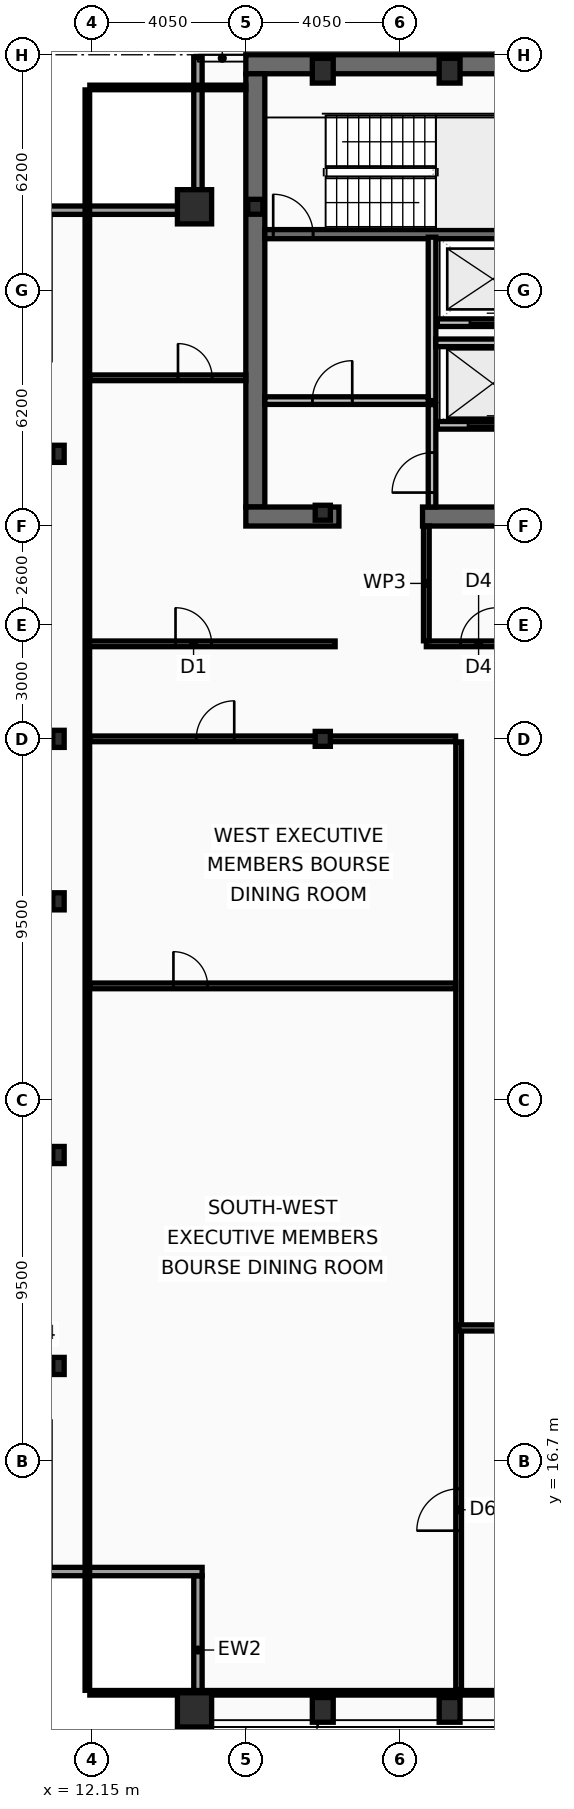
"""IFC4 building model, lengths in metres.
Left out: names, types, materials, properties, quantities, classifications, styles, units other than length and angle.
Written with IfcOpenShell. Run it as: python <this file> out.ifc"""

import sys

from ifc_helpers import new_model, si_unit, direction, frame, frame_2d, origin, origin_2d, place, context, subcontext, project, spatial, rectangle, hollow_rectangle, i_section, extrude, element, fill, save


model = new_model("IFC4")
c1 = context("Model", 3, precision=1e-05, world=origin(), true_north=direction((0.0, 1.0)))
c2 = subcontext(c1, "Body", "Model", "MODEL_VIEW")
j1 = project(units=[si_unit("LENGTHUNIT", "METRE"), si_unit("PLANEANGLEUNIT", "RADIAN")], contexts=[c1])
p1 = place(None, origin())
s1 = spatial("IfcSite", under=j1, at=p1, CompositionType="ELEMENT")
p2 = place(p1, origin())
s2 = spatial("IfcBuilding", under=s1, at=p2, CompositionType="ELEMENT")
p3 = place(p2, frame((0.0, 0.0, 302.2)))
s3 = spatial("IfcBuildingStorey", under=s2, at=p3, CompositionType="ELEMENT", Elevation=302.2)
p4 = place(p3, frame((16.2, 53.45, 0.0), z_axis=(0.0, 0.0, 1.0), x_axis=(1.0, 0.0, 0.0)))
e1 = element("IfcWall", 1, at=p4, inside=s3, PredefinedType="SHEAR", context=c2, shape_type="SweptSolid", body=[
    extrude(rectangle(XDim=40.5, YDim=0.5, at=frame_2d((20.25, 0.0))), origin(), (0.0, 0.0, 1.0), 3.38),
])
p5 = place(p3, frame((16.45, 41.8, 0.0), z_axis=(0.0, 0.0, 1.0), x_axis=(0.0, 1.0, 0.0)))
e2 = element("IfcWall", 2, at=p5, inside=s3, PredefinedType="SHEAR", context=c2, shape_type="SweptSolid", body=[
    extrude(rectangle(XDim=11.4, YDim=0.5, at=frame_2d((5.7, 0.0))), origin(), (0.0, 0.0, 1.0), 3.38),
])
p6 = place(p3, frame((18.65, 41.55, 0.0), z_axis=(0.0, 0.0, 1.0), x_axis=(-1.0, 0.0, 0.0)))
e3 = element("IfcWall", 3, at=p6, inside=s3, PredefinedType="SHEAR", context=c2, shape_type="SweptSolid", body=[
    extrude(rectangle(XDim=2.45, YDim=0.5, at=frame_2d((1.225, 0.0))), origin(), (0.0, 0.0, 1.0), 3.38),
])
p7 = place(p3, frame((32.3, 41.55, 0.0), z_axis=(0.0, 0.0, 1.0), x_axis=(-1.0, 0.0, 0.0)))
e4 = element("IfcWall", 4, at=p7, inside=s3, PredefinedType="SHEAR", context=c2, shape_type="SweptSolid", body=[
    extrude(rectangle(XDim=11.45, YDim=0.5, at=frame_2d((5.725, 0.0))), origin(), (0.0, 0.0, 1.0), 3.38),
])
p8 = place(p3, frame((16.7, 48.98, 0.0), z_axis=(0.0, 0.0, 1.0), x_axis=(1.0, 0.0, 0.0)))
e5 = element("IfcWall", 5, at=p8, inside=s3, PredefinedType="SHEAR", context=c2, shape_type="SweptSolid", body=[
    extrude(rectangle(XDim=7.52, YDim=0.24, at=frame_2d((3.76, 0.0))), origin(), (0.0, 0.0, 1.0), 3.38),
])
p9 = place(p8, frame((0.22, 0.0, 0.0)))
e6 = element("IfcOpeningElement", 6, at=p9, cuts=e5, PredefinedType="OPENING", context=c2, shape_type="SweptSolid", body=[
    extrude(rectangle(XDim=1.05, YDim=2.15, at=frame_2d((0.525, 1.075))), frame((0.0, 0.13, 0.0), z_axis=(0.0, -1.0, 0.0), x_axis=(1.0, 0.0, 0.0)), (0.0, 0.0, 1.0), 0.26),
])
for number, where, z_axis, x_axis in (
    (7, (14.85, 10.15, 0.0), (0.0, 0.0, 1.0), (1.0, 0.0, 0.0)),
    (8, (14.85, 49.7, 0.0), (0.0, 0.0, 1.0), (1.0, 0.0, 0.0)),
):
    element("IfcColumn", number, at=place(p3, frame(where, z_axis=z_axis, x_axis=x_axis)), inside=s3, PredefinedType="COLUMN", context=c2, shape_type="SweptSolid", body=[
        extrude(hollow_rectangle(XDim=0.9, YDim=0.9, WallThickness=0.05, at=origin_2d()), origin(), (0.0, 0.0, 1.0), 3.6),
    ])
for number, where, z_axis, x_axis in (
    (9, (18.225, 10.15, 0.0), (0.0, 0.0, 1.0), (1.0, 0.0, 0.0)),
    (10, (21.562, 10.15, 0.0), (0.0, 0.0, 1.0), (1.0, 0.0, 0.0)),
    (11, (18.225, 53.28, 0.0), (0.0, 0.0, 1.0), (1.0, 0.0, 0.0)),
    (12, (21.562, 53.28, 0.0), (0.0, 0.0, 1.0), (1.0, 0.0, 0.0)),
):
    element("IfcColumn", number, at=place(p3, frame(where, z_axis=z_axis, x_axis=x_axis)), inside=s3, PredefinedType="COLUMN", context=c2, shape_type="SweptSolid", body=[
        extrude(hollow_rectangle(XDim=0.55, YDim=0.65, WallThickness=0.04, at=origin_2d()), origin(), (0.0, 0.0, 1.0), 3.6),
    ])
for number, where, z_axis, x_axis in (
    (13, (11.27, 19.2, 0.0), (0.0, 0.0, 1.0), (1.0, 0.0, 0.0)),
    (14, (11.27, 24.75, 0.0), (0.0, 0.0, 1.0), (1.0, 0.0, 0.0)),
    (15, (11.27, 31.425, 0.0), (0.0, 0.0, 1.0), (1.0, 0.0, 0.0)),
    (16, (11.27, 35.7, 0.0), (0.0, 0.0, 1.0), (1.0, 0.0, 0.0)),
    (17, (11.27, 43.2, 0.0), (0.0, 0.0, 1.0), (1.0, 0.0, 0.0)),
):
    element("IfcColumn", number, at=place(p3, frame(where, z_axis=z_axis, x_axis=x_axis)), inside=s3, PredefinedType="COLUMN", context=c2, shape_type="SweptSolid", body=[
        extrude(i_section(OverallWidth=0.3, OverallDepth=0.45, WebThickness=0.014, FlangeThickness=0.026, at=origin_2d()), origin(), (0.0, 0.0, 1.0), 3.6),
    ])
for number, where, z_axis, x_axis in (
    (18, (16.45, 49.7, 0.0), (0.0, 0.0, 1.0), (1.0, 0.0, 0.0)),
    (19, (18.225, 35.7, 0.0), (0.0, 0.0, 1.0), (1.0, 0.0, 0.0)),
    (20, (18.225, 41.65, 0.0), (0.0, 0.0, 1.0), (1.0, 0.0, 0.0)),
):
    element("IfcColumn", number, at=place(p3, frame(where, z_axis=z_axis, x_axis=x_axis)), inside=s3, PredefinedType="COLUMN", context=c2, shape_type="SweptSolid", body=[
        extrude(i_section(OverallWidth=0.399, OverallDepth=0.393, WebThickness=0.023, FlangeThickness=0.037, at=origin_2d()), origin(), (0.0, 0.0, 1.0), 3.6),
    ])
p10 = place(p3, frame((14.94, 9.77, 0.0), z_axis=(0.0, 0.0, 1.0), x_axis=(0.0, 1.0, 0.0)))
e21 = element("IfcWall", 21, at=p10, inside=s3, PredefinedType="SOLIDWALL", context=c2, shape_type="SweptSolid", body=[
    extrude(rectangle(XDim=3.91, YDim=0.22, at=frame_2d((1.955, 0.0))), origin(), (0.0, 0.0, 1.0), 2.82),
])
for number, where, z_axis, x_axis in (
    (22, (15.05, 13.79, 0.0), (0.0, 0.0, 1.0), (-1.0, 0.0, 0.0)),
    (23, (10.83, 49.61, 0.0), (0.0, 0.0, 1.0), (1.0, 0.0, 0.0)),
):
    element("IfcWall", number, at=place(p3, frame(where, z_axis=z_axis, x_axis=x_axis)), inside=s3, PredefinedType="SOLIDWALL", context=c2, shape_type="SweptSolid", body=[
        extrude(rectangle(XDim=4.22, YDim=0.22, at=frame_2d((2.11, 0.0))), origin(), (0.0, 0.0, 1.0), 2.82),
    ])
p11 = place(p3, frame((14.94, 49.72, 0.0), z_axis=(0.0, 0.0, 1.0), x_axis=(0.0, 1.0, 0.0)))
e24 = element("IfcWall", 24, at=p11, inside=s3, PredefinedType="SOLIDWALL", context=c2, shape_type="SweptSolid", body=[
    extrude(rectangle(XDim=3.91, YDim=0.22, at=frame_2d((1.955, 0.0))), origin(), (0.0, 0.0, 1.0), 2.82),
])
p12 = place(p3, frame((24.21, 43.95, 0.0), z_axis=(0.0, 0.0, 1.0), x_axis=(-1.0, 0.0, 0.0)))
e25 = element("IfcWall", 25, at=p12, inside=s3, PredefinedType="PARTITIONING", context=c2, shape_type="SweptSolid", body=[
    extrude(rectangle(XDim=2.97, YDim=0.2, at=frame_2d((1.485, 0.0))), origin(), (0.0, 0.0, 1.0), 3.38),
])
p13 = place(p12, frame((0.86, 0.0, 0.0)))
e26 = element("IfcOpeningElement", 26, at=p13, cuts=e25, PredefinedType="OPENING", context=c2, shape_type="SweptSolid", body=[
    extrude(rectangle(XDim=1.3, YDim=2.18, at=frame_2d((0.65, 1.09))), frame((0.0, 0.11, 0.0), z_axis=(0.0, -1.0, 0.0), x_axis=(1.0, 0.0, 0.0)), (0.0, 0.0, 1.0), 0.22),
])
p14 = place(p3, frame((24.21, 46.65, 0.0), z_axis=(0.0, 0.0, 1.0), x_axis=(-1.0, 0.0, 0.0)))
e27 = element("IfcWall", 27, at=p14, inside=s3, PredefinedType="PARTITIONING", context=c2, shape_type="SweptSolid", body=[
    extrude(rectangle(XDim=2.97, YDim=0.2, at=frame_2d((1.485, 0.0))), origin(), (0.0, 0.0, 1.0), 3.38),
])
p15 = place(p14, frame((0.91, 0.0, 0.0)))
e28 = element("IfcOpeningElement", 28, at=p15, cuts=e27, PredefinedType="OPENING", context=c2, shape_type="SweptSolid", body=[
    extrude(rectangle(XDim=1.2, YDim=2.18, at=frame_2d((0.6, 1.09))), frame((0.0, 0.11, 0.0), z_axis=(0.0, -1.0, 0.0), x_axis=(1.0, 0.0, 0.0)), (0.0, 0.0, 1.0), 0.22),
])
p16 = place(p3, frame((21.1, 44.6, 0.0), z_axis=(0.0, 0.0, 1.0), x_axis=(0.0, 1.0, 0.0)))
e29 = element("IfcWall", 29, at=p16, inside=s3, PredefinedType="PARTITIONING", context=c2, shape_type="SweptSolid", body=[
    extrude(rectangle(XDim=4.3, YDim=0.2, at=frame_2d((2.15, 0.0))), origin(), (0.0, 0.0, 1.0), 3.38),
])
p17 = place(p3, frame((16.7, 44.6, 0.0), z_axis=(0.0, 0.0, 1.0), x_axis=(1.0, 0.0, 0.0)))
e30 = element("IfcWall", 30, at=p17, inside=s3, PredefinedType="PARTITIONING", context=c2, shape_type="SweptSolid", body=[
    extrude(rectangle(XDim=4.3, YDim=0.2, at=frame_2d((2.15, 0.0))), origin(), (0.0, 0.0, 1.0), 3.38),
])
p18 = place(p17, frame((1.25, 0.0, 0.0)))
e31 = element("IfcOpeningElement", 31, at=p18, cuts=e30, PredefinedType="OPENING", context=c2, shape_type="SweptSolid", body=[
    extrude(rectangle(XDim=1.05, YDim=2.15, at=frame_2d((0.525, 1.075))), frame((0.0, 0.11, 0.0), z_axis=(0.0, -1.0, 0.0), x_axis=(1.0, 0.0, 0.0)), (0.0, 0.0, 1.0), 0.22),
])
p19 = place(p3, frame((21.2, 46.12, 0.0), z_axis=(0.0, 0.0, 1.0), x_axis=(1.0, 0.0, 0.0)))
e32 = element("IfcWall", 32, at=p19, inside=s3, PredefinedType="PARTITIONING", context=c2, shape_type="SweptSolid", body=[
    extrude(rectangle(XDim=3.02, YDim=0.2, at=frame_2d((1.51, 0.0))), origin(), (0.0, 0.0, 1.0), 3.38),
])
p20 = place(p3, frame((21.1, 41.8, 0.0), z_axis=(0.0, 0.0, 1.0), x_axis=(0.0, 1.0, 0.0)))
e33 = element("IfcWall", 33, at=p20, inside=s3, PredefinedType="PARTITIONING", context=c2, shape_type="SweptSolid", body=[
    extrude(rectangle(XDim=2.695, YDim=0.2, at=frame_2d((1.348, 0.0))), origin(), (0.0, 0.0, 1.0), 3.38),
])
p21 = place(p20, frame((0.38, 0.0, 0.0)))
e34 = element("IfcOpeningElement", 34, at=p21, cuts=e33, PredefinedType="OPENING", context=c2, shape_type="SweptSolid", body=[
    extrude(rectangle(XDim=1.05, YDim=2.15, at=frame_2d((0.525, 1.075))), frame((0.0, 0.11, 0.0), z_axis=(0.0, -1.0, 0.0), x_axis=(1.0, 0.0, 0.0)), (0.0, 0.0, 1.0), 0.22),
])
p22 = place(p3, frame((20.95, 38.2, 0.0), z_axis=(0.0, 0.0, 1.0), x_axis=(1.0, 0.0, 0.0)))
e35 = element("IfcWall", 35, at=p22, inside=s3, PredefinedType="PARTITIONING", context=c2, shape_type="SweptSolid", body=[
    extrude(rectangle(XDim=4.15, YDim=0.15, at=frame_2d((2.075, 0.0))), origin(), (0.0, 0.0, 1.0), 2.72),
])
p23 = place(p22, frame((0.9, 0.0, 0.0)))
e36 = element("IfcOpeningElement", 36, at=p23, cuts=e35, PredefinedType="OPENING", context=c2, shape_type="SweptSolid", body=[
    extrude(rectangle(XDim=0.95, YDim=2.05, at=frame_2d((0.475, 1.025))), frame((0.0, 0.085, 0.0), z_axis=(0.0, -1.0, 0.0), x_axis=(1.0, 0.0, 0.0)), (0.0, 0.0, 1.0), 0.17),
])
p24 = place(p3, frame((20.95, 38.28, 0.0), z_axis=(0.0, 0.0, 1.0), x_axis=(0.0, 1.0, 0.0)))
e37 = element("IfcWall", 37, at=p24, inside=s3, PredefinedType="PARTITIONING", context=c2, shape_type="SweptSolid", body=[
    extrude(rectangle(XDim=3.02, YDim=0.15, at=frame_2d((1.51, 0.0))), origin(), (0.0, 0.0, 1.0), 3.38),
])
p25 = place(p3, frame((12.03, 38.2, 0.0), z_axis=(0.0, 0.0, 1.0), x_axis=(1.0, 0.0, 0.0)))
e38 = element("IfcWall", 38, at=p25, inside=s3, PredefinedType="PARTITIONING", context=c2, shape_type="SweptSolid", body=[
    extrude(rectangle(XDim=6.52, YDim=0.15, at=frame_2d((3.26, 0.0))), origin(), (0.0, 0.0, 1.0), 2.72),
])
p26 = place(p25, frame((2.32, 0.0, 0.0)))
e39 = element("IfcOpeningElement", 39, at=p26, cuts=e38, PredefinedType="OPENING", context=c2, shape_type="SweptSolid", body=[
    extrude(rectangle(XDim=0.95, YDim=2.05, at=frame_2d((0.475, 1.025))), frame((0.0, 0.085, 0.0), z_axis=(0.0, -1.0, 0.0), x_axis=(1.0, 0.0, 0.0)), (0.0, 0.0, 1.0), 0.17),
])
p27 = place(p3, frame((12.095, 45.2, 0.0), z_axis=(0.0, 0.0, 1.0), x_axis=(1.0, 0.0, 0.0)))
e40 = element("IfcWall", 40, at=p27, inside=s3, PredefinedType="PARTITIONING", context=c2, shape_type="SweptSolid", body=[
    extrude(rectangle(XDim=4.105, YDim=0.15, at=frame_2d((2.052, 0.0))), origin(), (0.0, 0.0, 1.0), 2.82),
])
p28 = place(p27, frame((2.32, 0.0, 0.0)))
e41 = element("IfcOpeningElement", 41, at=p28, cuts=e40, PredefinedType="OPENING", context=c2, shape_type="SweptSolid", body=[
    extrude(rectangle(XDim=0.9, YDim=2.05, at=frame_2d((0.45, 1.025))), frame((0.0, 0.085, 0.0), z_axis=(0.0, -1.0, 0.0), x_axis=(1.0, 0.0, 0.0)), (0.0, 0.0, 1.0), 0.17),
])
p29 = place(p3, frame((21.8, 10.665, 0.0), z_axis=(0.0, 0.0, 1.0), x_axis=(0.0, 1.0, 0.0)))
e42 = element("IfcWall", 42, at=p29, inside=s3, PredefinedType="PARTITIONING", context=c2, shape_type="SweptSolid", body=[
    extrude(rectangle(XDim=24.955, YDim=0.15, at=frame_2d((12.478, 0.0))), origin(), (0.0, 0.0, 1.0), 2.97),
])
p30 = place(p29, frame((4.2, 0.0, 0.0)))
e43 = element("IfcOpeningElement", 43, at=p30, cuts=e42, PredefinedType="OPENING", context=c2, shape_type="SweptSolid", body=[
    extrude(rectangle(XDim=1.1, YDim=2.1, at=frame_2d((0.55, 1.05))), frame((0.0, 0.085, 0.0), z_axis=(0.0, -1.0, 0.0), x_axis=(1.0, 0.0, 0.0)), (0.0, 0.0, 1.0), 0.17),
])
p31 = place(p3, frame((12.095, 35.7, 0.0), z_axis=(0.0, 0.0, 1.0), x_axis=(1.0, 0.0, 0.0)))
e44 = element("IfcWall", 44, at=p31, inside=s3, PredefinedType="PARTITIONING", context=c2, shape_type="SweptSolid", body=[
    extrude(rectangle(XDim=9.625, YDim=0.15, at=frame_2d((4.812, 0.0))), origin(), (0.0, 0.0, 1.0), 2.72),
])
p32 = place(p31, frame((2.8, 0.0, 0.0)))
e45 = element("IfcOpeningElement", 45, at=p32, cuts=e44, PredefinedType="OPENING", context=c2, shape_type="SweptSolid", body=[
    extrude(rectangle(XDim=1.0, YDim=2.05, at=frame_2d((0.5, 1.025))), frame((0.0, 0.085, 0.0), z_axis=(0.0, -1.0, 0.0), x_axis=(1.0, 0.0, 0.0)), (0.0, 0.0, 1.0), 0.17),
])
p33 = place(p3, frame((12.095, 29.2, 0.0), z_axis=(0.0, 0.0, 1.0), x_axis=(1.0, 0.0, 0.0)))
e46 = element("IfcWall", 46, at=p33, inside=s3, PredefinedType="PARTITIONING", context=c2, shape_type="SweptSolid", body=[
    extrude(rectangle(XDim=9.625, YDim=0.15, at=frame_2d((4.812, 0.0))), origin(), (0.0, 0.0, 1.0), 2.72),
])
p34 = place(p33, frame((2.2, 0.0, 0.0)))
e47 = element("IfcOpeningElement", 47, at=p34, cuts=e46, PredefinedType="OPENING", context=c2, shape_type="SweptSolid", body=[
    extrude(rectangle(XDim=0.9, YDim=2.05, at=frame_2d((0.45, 1.025))), frame((0.0, 0.085, 0.0), z_axis=(0.0, -1.0, 0.0), x_axis=(1.0, 0.0, 0.0)), (0.0, 0.0, 1.0), 0.17),
])
p35 = place(p3, frame((21.8, 20.2, 0.0), z_axis=(0.0, 0.0, 1.0), x_axis=(1.0, 0.0, 0.0)))
e48 = element("IfcWall", 48, at=p35, inside=s3, PredefinedType="PARTITIONING", context=c2, shape_type="SweptSolid", body=[
    extrude(rectangle(XDim=9.26, YDim=0.16, at=frame_2d((4.63, 0.0))), origin(), (0.0, 0.0, 1.0), 2.72),
])
p36 = place(p35, frame((4.139, 0.0, 0.0)))
e49 = element("IfcOpeningElement", 49, at=p36, cuts=e48, PredefinedType="OPENING", context=c2, shape_type="SweptSolid", body=[
    extrude(rectangle(XDim=1.0, YDim=2.05, at=frame_2d((0.5, 1.025))), frame((0.0, 0.09, 0.0), z_axis=(0.0, -1.0, 0.0), x_axis=(1.0, 0.0, 0.0)), (0.0, 0.0, 1.0), 0.18),
])
p37 = place(p3, frame((12.03, 10.665, 0.0), z_axis=(0.0, 0.0, 1.0), x_axis=(0.0, 1.0, 0.0)))
e50 = element("IfcWall", 50, at=p37, inside=s3, PredefinedType="PARTITIONING", context=c2, shape_type="SweptSolid", body=[
    extrude(rectangle(XDim=42.11, YDim=0.12, at=frame_2d((21.055, 0.0))), origin(), (0.0, 0.0, 1.0), 2.72),
])
p38 = place(p3, frame((12.095, 52.84, 0.0), z_axis=(0.0, 0.0, 1.0), x_axis=(1.0, 0.0, 0.0)))
e51 = element("IfcWall", 51, at=p38, inside=s3, PredefinedType="PARTITIONING", context=c2, shape_type="SweptSolid", body=[
    extrude(rectangle(XDim=4.105, YDim=0.12, at=frame_2d((2.052, 0.0))), origin(), (0.0, 0.0, 1.0), 3.38),
])
p39 = place(p3, frame((12.095, 10.6, 0.0), z_axis=(0.0, 0.0, 1.0), x_axis=(1.0, 0.0, 0.0)))
e52 = element("IfcWall", 52, at=p39, inside=s3, PredefinedType="PARTITIONING", context=c2, shape_type="SweptSolid", body=[
    extrude(rectangle(XDim=48.71, YDim=0.12, at=frame_2d((24.355, 0.0))), origin(), (0.0, 0.0, 1.0), 2.72),
])
p40 = place(p9, origin())
e53 = element("IfcDoor", 53, at=p40, inside=s3, OperationType="SINGLE_SWING_LEFT", PredefinedType="DOOR", context=c2, shape_type="SweptSolid", body=[
    extrude(rectangle(XDim=1.05, YDim=2.15, at=frame_2d((0.525, 1.075))), frame((0.0, 0.025, 0.0), z_axis=(0.0, -1.0, 0.0), x_axis=(1.0, 0.0, 0.0)), (0.0, 0.0, 1.0), 0.05),
])
fill(e6, e53)
p41 = place(p13, origin())
e54 = element("IfcDoor", 54, at=p41, inside=s3, OperationType="SLIDING_TO_LEFT", PredefinedType="DOOR", context=c2, shape_type="SweptSolid", body=[
    extrude(rectangle(XDim=1.3, YDim=2.18, at=frame_2d((0.65, 1.09))), frame((0.0, 0.025, 0.0), z_axis=(0.0, -1.0, 0.0), x_axis=(1.0, 0.0, 0.0)), (0.0, 0.0, 1.0), 0.05),
])
fill(e26, e54)
p42 = place(p15, origin())
e55 = element("IfcDoor", 55, at=p42, inside=s3, OperationType="SLIDING_TO_LEFT", PredefinedType="DOOR", context=c2, shape_type="SweptSolid", body=[
    extrude(rectangle(XDim=1.2, YDim=2.18, at=frame_2d((0.6, 1.09))), frame((0.0, 0.025, 0.0), z_axis=(0.0, -1.0, 0.0), x_axis=(1.0, 0.0, 0.0)), (0.0, 0.0, 1.0), 0.05),
])
fill(e28, e55)
p43 = place(p18, origin())
e56 = element("IfcDoor", 56, at=p43, inside=s3, OperationType="SINGLE_SWING_RIGHT", PredefinedType="DOOR", context=c2, shape_type="SweptSolid", body=[
    extrude(rectangle(XDim=1.05, YDim=2.15, at=frame_2d((0.525, 1.075))), frame((0.0, 0.025, 0.0), z_axis=(0.0, -1.0, 0.0), x_axis=(1.0, 0.0, 0.0)), (0.0, 0.0, 1.0), 0.05),
])
fill(e31, e56)
p44 = place(p21, origin())
e57 = element("IfcDoor", 57, at=p44, inside=s3, OperationType="SINGLE_SWING_LEFT", PredefinedType="DOOR", context=c2, shape_type="SweptSolid", body=[
    extrude(rectangle(XDim=1.05, YDim=2.15, at=frame_2d((0.525, 1.075))), frame((0.0, 0.025, 0.0), z_axis=(0.0, -1.0, 0.0), x_axis=(1.0, 0.0, 0.0)), (0.0, 0.0, 1.0), 0.05),
])
fill(e34, e57)
p45 = place(p23, origin())
e58 = element("IfcDoor", 58, at=p45, inside=s3, OperationType="SINGLE_SWING_RIGHT", PredefinedType="DOOR", context=c2, shape_type="SweptSolid", body=[
    extrude(rectangle(XDim=0.95, YDim=2.05, at=frame_2d((0.475, 1.025))), frame((0.0, 0.025, 0.0), z_axis=(0.0, -1.0, 0.0), x_axis=(1.0, 0.0, 0.0)), (0.0, 0.0, 1.0), 0.05),
])
fill(e36, e58)
p46 = place(p26, origin())
e59 = element("IfcDoor", 59, at=p46, inside=s3, OperationType="SINGLE_SWING_LEFT", PredefinedType="DOOR", context=c2, shape_type="SweptSolid", body=[
    extrude(rectangle(XDim=0.95, YDim=2.05, at=frame_2d((0.475, 1.025))), frame((0.0, 0.025, 0.0), z_axis=(0.0, -1.0, 0.0), x_axis=(1.0, 0.0, 0.0)), (0.0, 0.0, 1.0), 0.05),
])
fill(e39, e59)
p47 = place(p28, origin())
e60 = element("IfcDoor", 60, at=p47, inside=s3, OperationType="SINGLE_SWING_LEFT", PredefinedType="DOOR", context=c2, shape_type="SweptSolid", body=[
    extrude(rectangle(XDim=0.9, YDim=2.05, at=frame_2d((0.45, 1.025))), frame((0.0, 0.025, 0.0), z_axis=(0.0, -1.0, 0.0), x_axis=(1.0, 0.0, 0.0)), (0.0, 0.0, 1.0), 0.05),
])
fill(e41, e60)
p48 = place(p30, origin())
e61 = element("IfcDoor", 61, at=p48, inside=s3, OperationType="SINGLE_SWING_LEFT", PredefinedType="DOOR", context=c2, shape_type="SweptSolid", body=[
    extrude(rectangle(XDim=1.1, YDim=2.1, at=frame_2d((0.55, 1.05))), frame((0.0, 0.025, 0.0), z_axis=(0.0, -1.0, 0.0), x_axis=(1.0, 0.0, 0.0)), (0.0, 0.0, 1.0), 0.05),
])
fill(e43, e61)
p49 = place(p32, origin())
e62 = element("IfcDoor", 62, at=p49, inside=s3, OperationType="SINGLE_SWING_RIGHT", PredefinedType="DOOR", context=c2, shape_type="SweptSolid", body=[
    extrude(rectangle(XDim=1.0, YDim=2.05, at=frame_2d((0.5, 1.025))), frame((0.0, 0.025, 0.0), z_axis=(0.0, -1.0, 0.0), x_axis=(1.0, 0.0, 0.0)), (0.0, 0.0, 1.0), 0.05),
])
fill(e45, e62)
p50 = place(p34, origin())
e63 = element("IfcDoor", 63, at=p50, inside=s3, OperationType="SINGLE_SWING_LEFT", PredefinedType="DOOR", context=c2, shape_type="SweptSolid", body=[
    extrude(rectangle(XDim=0.9, YDim=2.05, at=frame_2d((0.45, 1.025))), frame((0.0, 0.025, 0.0), z_axis=(0.0, -1.0, 0.0), x_axis=(1.0, 0.0, 0.0)), (0.0, 0.0, 1.0), 0.05),
])
fill(e47, e63)
save(model, sys.argv[1])
